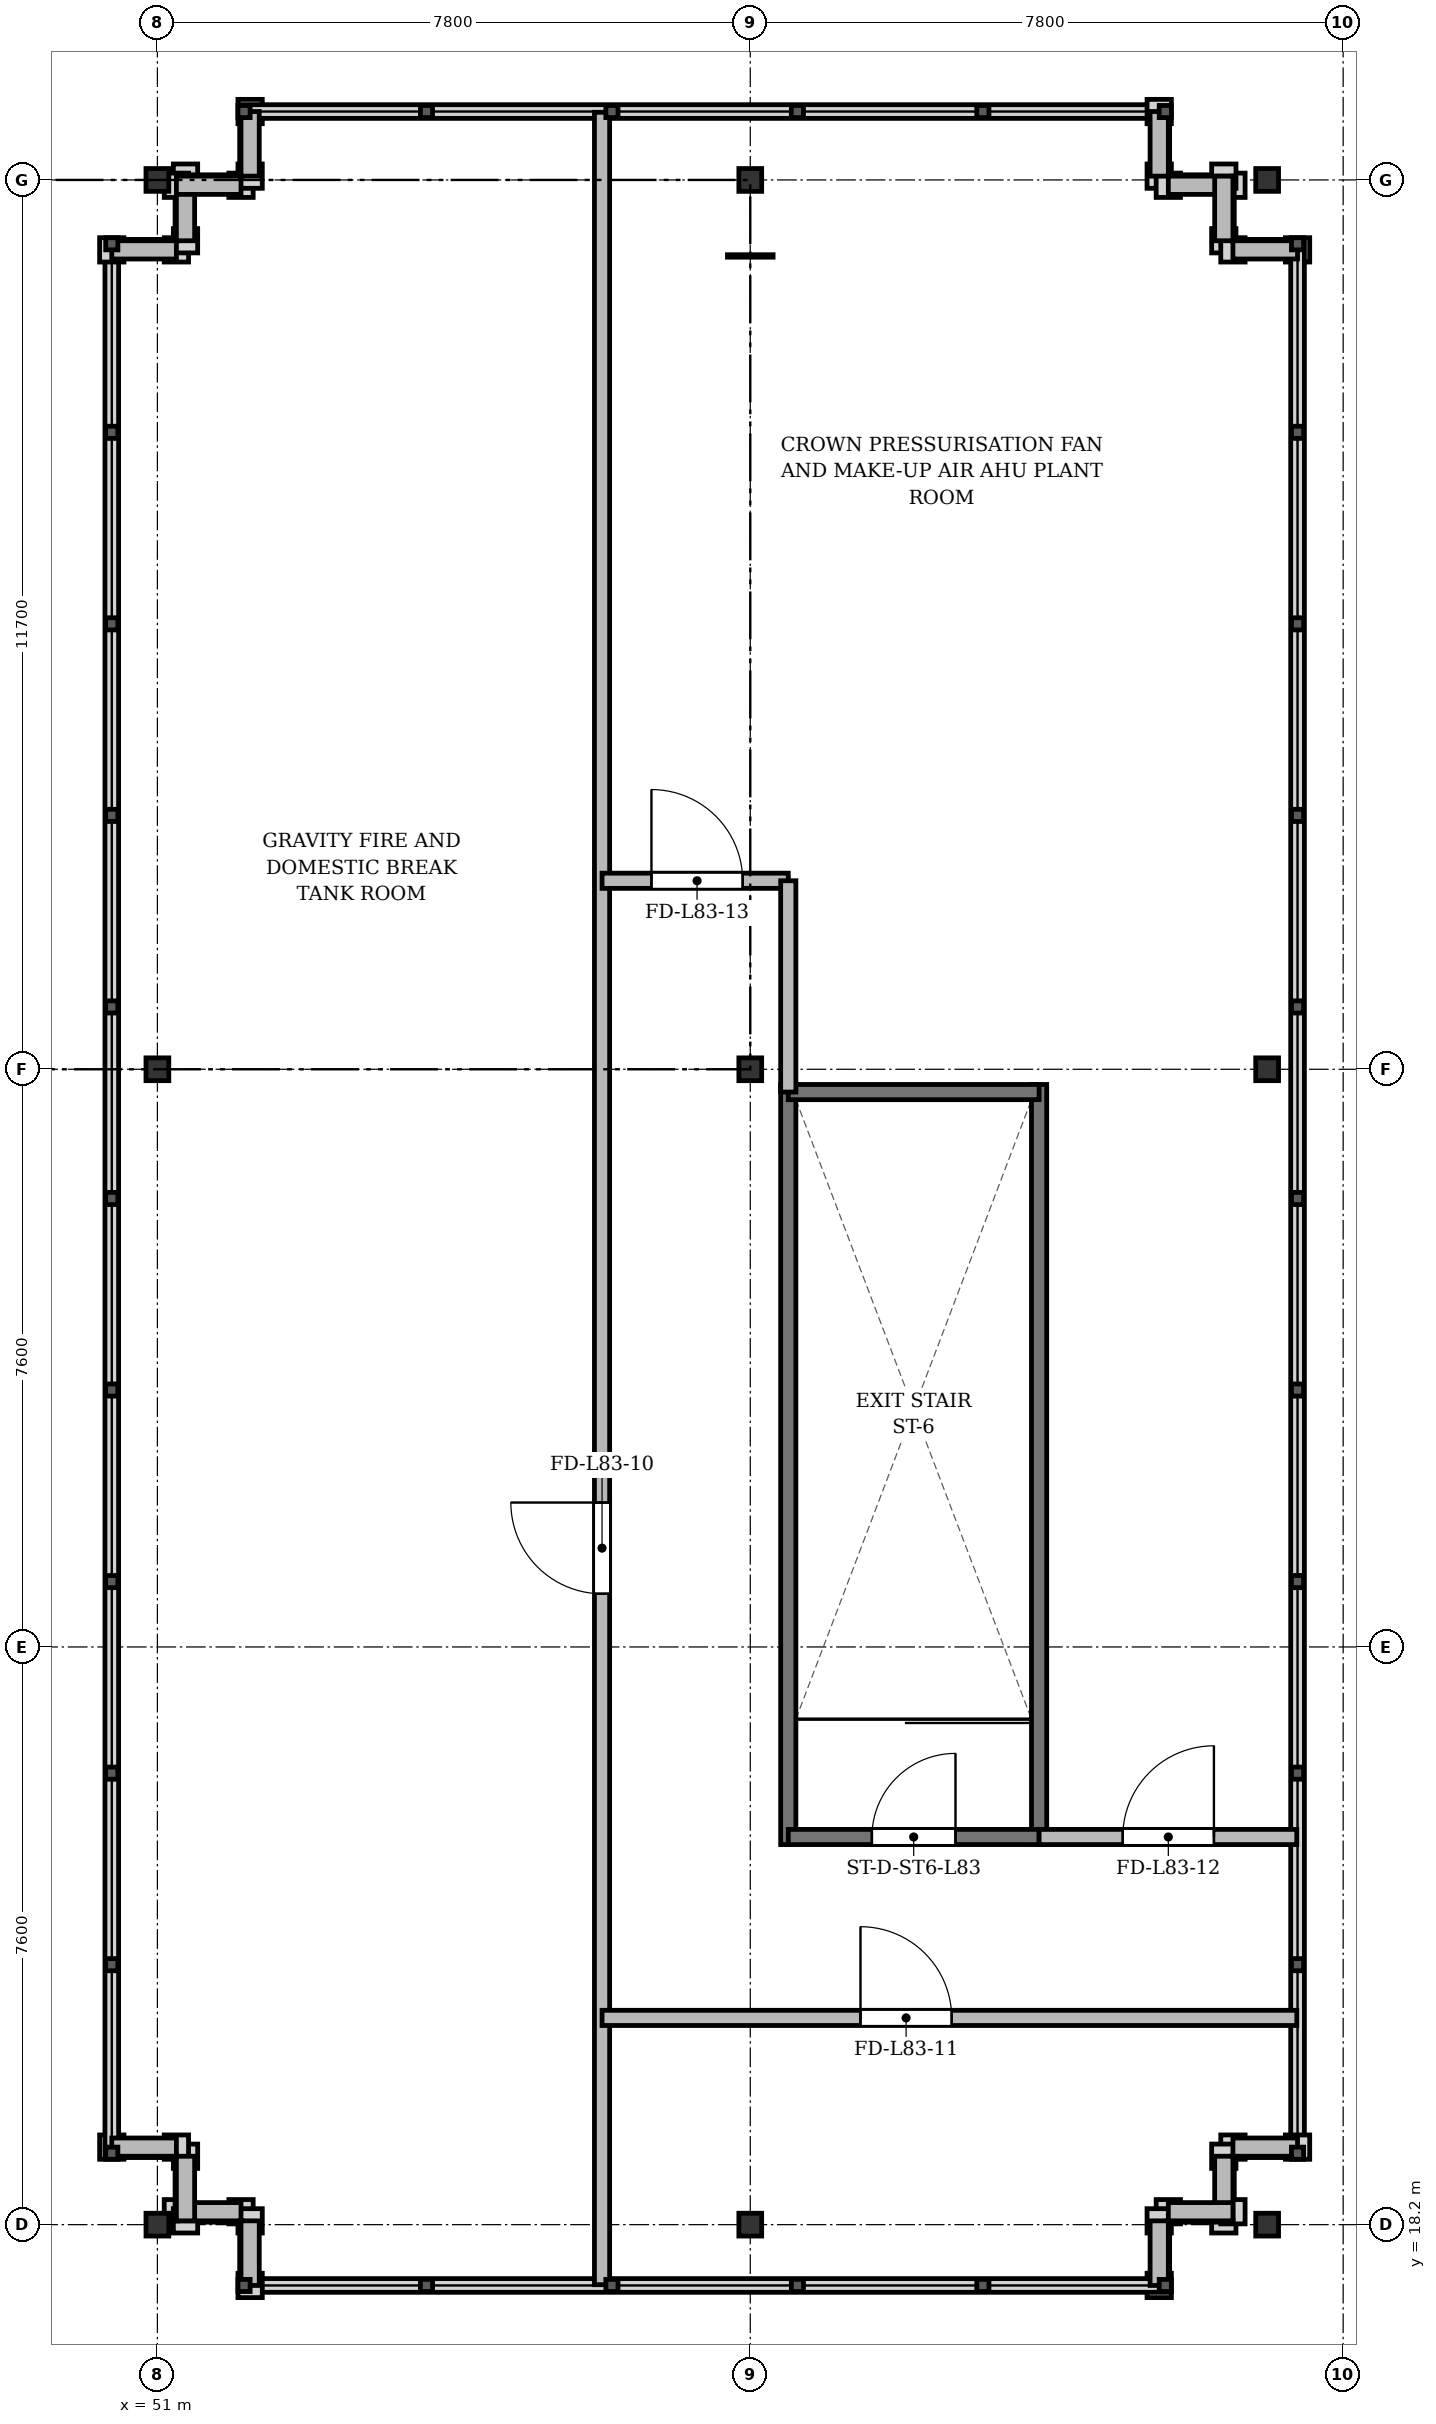
"""IFC4 building model, lengths in metres.
Left out: names, types, materials, properties, quantities, classifications, styles, units other than length and angle.
Written with IfcOpenShell. Run it as: python <this file> out.ifc"""

import sys

from ifc_helpers import new_model, si_unit, direction, frame, frame_2d, origin, origin_2d, place, context, subcontext, project, spatial, rectangle, i_section, extrude, source, transform, mapped, element, fill, save


model = new_model("IFC4")
c1 = context("Model", 3, precision=1e-05, world=origin(), true_north=direction((0.0, 1.0)))
c2 = subcontext(c1, "Body", "Model", "MODEL_VIEW")
j1 = project(units=[si_unit("LENGTHUNIT", "METRE"), si_unit("PLANEANGLEUNIT", "RADIAN")], contexts=[c1])
p1 = place(None, origin())
s1 = spatial("IfcSite", under=j1, at=p1, CompositionType="ELEMENT")
p2 = place(p1, origin())
s2 = spatial("IfcBuilding", under=s1, at=p2, CompositionType="ELEMENT")
p3 = place(p2, frame((0.0, 0.0, 320.9)))
s3 = spatial("IfcBuildingStorey", under=s2, at=p3, CompositionType="ELEMENT", Elevation=320.9)
m1 = source(origin(), c2, "Body", "SweptSolid", [
    extrude(i_section(OverallWidth=0.3, OverallDepth=0.3, WebThickness=0.015, FlangeThickness=0.024, at=origin_2d()), origin(), (0.0, 0.0, 1.0), 4.2),
])
for number, where, z_axis, x_axis in (
    (1, (51.0, 18.2, 0.0), (0.0, 0.0, 1.0), (1.0, 0.0, 0.0)),
    (2, (51.0, 33.4, 0.0), (0.0, 0.0, 1.0), (1.0, 0.0, 0.0)),
    (3, (51.0, 45.1, 0.0), (0.0, 0.0, 1.0), (1.0, 0.0, 0.0)),
    (4, (58.8, 18.2, 0.0), (0.0, 0.0, 1.0), (1.0, 0.0, 0.0)),
    (5, (58.8, 33.4, 0.0), (0.0, 0.0, 1.0), (1.0, 0.0, 0.0)),
    (6, (58.8, 45.1, 0.0), (0.0, 0.0, 1.0), (1.0, 0.0, 0.0)),
    (7, (65.6, 18.2, 0.0), (0.0, 0.0, 1.0), (1.0, 0.0, 0.0)),
    (8, (65.6, 33.4, 0.0), (0.0, 0.0, 1.0), (1.0, 0.0, 0.0)),
    (9, (65.6, 45.1, 0.0), (0.0, 0.0, 1.0), (1.0, 0.0, 0.0)),
):
    element("IfcColumn", number, at=place(p3, frame(where, z_axis=z_axis, x_axis=x_axis)), inside=s3, PredefinedType="COLUMN", context=c2, shape_type="MappedRepresentation", body=[
        mapped(m1, transform((0.0, 0.0, 0.0), x_axis=(1.0, 0.0, 0.0), y_axis=(0.0, 1.0, 0.0), z_axis=(0.0, 0.0, 1.0), scale=1.0)),
    ])
for number, where, z_axis, x_axis in (
    (10, (52.1, 18.37, 0.0), (0.0, 0.0, 1.0), (-1.0, 0.0, 0.0)),
    (11, (51.37, 18.25, 0.0), (0.0, 0.0, 1.0), (0.0, 1.0, 0.0)),
    (12, (51.25, 19.22, 0.0), (0.0, 0.0, 1.0), (-1.0, 0.0, 0.0)),
    (13, (50.4, 44.18, 0.0), (0.0, 0.0, 1.0), (1.0, 0.0, 0.0)),
):
    element("IfcWall", number, at=place(p3, frame(where, z_axis=z_axis, x_axis=x_axis)), inside=s3, PredefinedType="SOLIDWALL", context=c2, shape_type="SweptSolid", body=[
        extrude(rectangle(XDim=0.85, YDim=0.24, at=frame_2d((0.425, 0.0))), origin(), (0.0, 0.0, 1.0), 3.4),
    ])
p4 = place(p3, frame((51.37, 44.3, 0.0), z_axis=(0.0, 0.0, 1.0), x_axis=(0.0, 1.0, 0.0)))
e14 = element("IfcWall", 14, at=p4, inside=s3, PredefinedType="SOLIDWALL", context=c2, shape_type="SweptSolid", body=[
    extrude(rectangle(XDim=0.85, YDim=0.24, at=frame_2d((0.425, 0.0))), origin(), (0.0, 0.0, 1.0), 3.4),
])
for number, where, z_axis, x_axis in (
    (15, (51.25, 45.03, 0.0), (0.0, 0.0, 1.0), (1.0, 0.0, 0.0)),
    (16, (52.22, 45.15, 0.0), (0.0, 0.0, 1.0), (0.0, 1.0, 0.0)),
    (17, (64.18, 46.0, 0.0), (0.0, 0.0, 1.0), (0.0, -1.0, 0.0)),
):
    element("IfcWall", number, at=place(p3, frame(where, z_axis=z_axis, x_axis=x_axis)), inside=s3, PredefinedType="SOLIDWALL", context=c2, shape_type="SweptSolid", body=[
        extrude(rectangle(XDim=0.85, YDim=0.24, at=frame_2d((0.425, 0.0))), origin(), (0.0, 0.0, 1.0), 3.4),
    ])
for number, where, z_axis, x_axis in (
    (18, (64.3, 45.03, 0.0), (0.0, 0.0, 1.0), (1.0, 0.0, 0.0)),
    (19, (65.03, 45.15, 0.0), (0.0, 0.0, 1.0), (0.0, -1.0, 0.0)),
):
    element("IfcWall", number, at=place(p3, frame(where, z_axis=z_axis, x_axis=x_axis)), inside=s3, PredefinedType="SOLIDWALL", context=c2, shape_type="SweptSolid", body=[
        extrude(rectangle(XDim=0.85, YDim=0.24, at=frame_2d((0.425, 0.0))), origin(), (0.0, 0.0, 1.0), 3.4),
    ])
for number, where, z_axis, x_axis in (
    (20, (65.15, 44.18, 0.0), (0.0, 0.0, 1.0), (1.0, 0.0, 0.0)),
    (21, (66.0, 19.22, 0.0), (0.0, 0.0, 1.0), (-1.0, 0.0, 0.0)),
    (22, (65.03, 19.1, 0.0), (0.0, 0.0, 1.0), (0.0, -1.0, 0.0)),
):
    element("IfcWall", number, at=place(p3, frame(where, z_axis=z_axis, x_axis=x_axis)), inside=s3, PredefinedType="SOLIDWALL", context=c2, shape_type="SweptSolid", body=[
        extrude(rectangle(XDim=0.85, YDim=0.24, at=frame_2d((0.425, 0.0))), origin(), (0.0, 0.0, 1.0), 3.4),
    ])
p5 = place(p3, frame((65.15, 18.37, 0.0), z_axis=(0.0, 0.0, 1.0), x_axis=(-1.0, 0.0, 0.0)))
e23 = element("IfcWall", 23, at=p5, inside=s3, PredefinedType="SOLIDWALL", context=c2, shape_type="SweptSolid", body=[
    extrude(rectangle(XDim=0.85, YDim=0.24, at=frame_2d((0.425, 0.0))), origin(), (0.0, 0.0, 1.0), 3.4),
])
for number, where, z_axis, x_axis in (
    (24, (64.18, 18.25, 0.0), (0.0, 0.0, 1.0), (0.0, -1.0, 0.0)),
    (25, (52.22, 17.4, 0.0), (0.0, 0.0, 1.0), (0.0, 1.0, 0.0)),
):
    element("IfcWall", number, at=place(p3, frame(where, z_axis=z_axis, x_axis=x_axis)), inside=s3, PredefinedType="SOLIDWALL", context=c2, shape_type="SweptSolid", body=[
        extrude(rectangle(XDim=0.85, YDim=0.24, at=frame_2d((0.425, 0.0))), origin(), (0.0, 0.0, 1.0), 3.4),
    ])
for number, where, z_axis, x_axis in (
    (26, (59.3, 23.2, 0.0), (0.0, 0.0, 1.0), (0.0, 1.0, 0.0)),
    (27, (62.6, 23.2, 0.0), (0.0, 0.0, 1.0), (0.0, 1.0, 0.0)),
):
    element("IfcWall", number, at=place(p3, frame(where, z_axis=z_axis, x_axis=x_axis)), inside=s3, PredefinedType="SHEAR", context=c2, shape_type="SweptSolid", body=[
        extrude(rectangle(XDim=10.0, YDim=0.2, at=frame_2d((5.0, 0.0))), origin(), (0.0, 0.0, 1.0), 3.9),
    ])
p6 = place(p3, frame((59.3, 33.1, 0.0), z_axis=(0.0, 0.0, 1.0), x_axis=(1.0, 0.0, 0.0)))
e28 = element("IfcWall", 28, at=p6, inside=s3, PredefinedType="SHEAR", context=c2, shape_type="SweptSolid", body=[
    extrude(rectangle(XDim=3.3, YDim=0.2, at=frame_2d((1.65, 0.0))), origin(), (0.0, 0.0, 1.0), 3.9),
])
p7 = place(p3, frame((59.3, 23.3, 0.0), z_axis=(0.0, 0.0, 1.0), x_axis=(1.0, 0.0, 0.0)))
e29 = element("IfcWall", 29, at=p7, inside=s3, PredefinedType="SHEAR", context=c2, shape_type="SweptSolid", body=[
    extrude(rectangle(XDim=3.3, YDim=0.2, at=frame_2d((1.65, 0.0))), origin(), (0.0, 0.0, 1.0), 3.9),
])
p8 = place(p7, frame((1.1, 0.0, 0.0)))
e30 = element("IfcOpeningElement", 30, at=p8, cuts=e29, PredefinedType="OPENING", context=c2, shape_type="SweptSolid", body=[
    extrude(rectangle(XDim=1.1, YDim=2.15, at=frame_2d((0.55, 1.075))), frame((0.0, 0.11, 0.0), z_axis=(0.0, -1.0, 0.0), x_axis=(1.0, 0.0, 0.0)), (0.0, 0.0, 1.0), 0.22),
])
p9 = place(p3, frame((56.85, 17.41, 0.0), z_axis=(0.0, 0.0, 1.0), x_axis=(0.0, 1.0, 0.0)))
e31 = element("IfcWall", 31, at=p9, inside=s3, PredefinedType="PARTITIONING", context=c2, shape_type="SweptSolid", body=[
    extrude(rectangle(XDim=28.58, YDim=0.2, at=frame_2d((14.29, 0.0))), origin(), (0.0, 0.0, 1.0), 3.4),
])
p10 = place(p9, frame((9.09, 0.0, 0.0)))
e32 = element("IfcOpeningElement", 32, at=p10, cuts=e31, PredefinedType="OPENING", context=c2, shape_type="SweptSolid", body=[
    extrude(rectangle(XDim=1.2, YDim=2.15, at=frame_2d((0.6, 1.075))), frame((0.0, 0.11, 0.0), z_axis=(0.0, -1.0, 0.0), x_axis=(1.0, 0.0, 0.0)), (0.0, 0.0, 1.0), 0.22),
])
p11 = place(p3, frame((56.85, 20.92, 0.0), z_axis=(0.0, 0.0, 1.0), x_axis=(1.0, 0.0, 0.0)))
e33 = element("IfcWall", 33, at=p11, inside=s3, PredefinedType="PARTITIONING", context=c2, shape_type="SweptSolid", body=[
    extrude(rectangle(XDim=9.14, YDim=0.2, at=frame_2d((4.57, 0.0))), origin(), (0.0, 0.0, 1.0), 3.4),
])
p12 = place(p11, frame((3.4, 0.0, 0.0)))
e34 = element("IfcOpeningElement", 34, at=p12, cuts=e33, PredefinedType="OPENING", context=c2, shape_type="SweptSolid", body=[
    extrude(rectangle(XDim=1.2, YDim=2.15, at=frame_2d((0.6, 1.075))), frame((0.0, 0.11, 0.0), z_axis=(0.0, -1.0, 0.0), x_axis=(1.0, 0.0, 0.0)), (0.0, 0.0, 1.0), 0.22),
])
p13 = place(p3, frame((62.6, 23.3, 0.0), z_axis=(0.0, 0.0, 1.0), x_axis=(1.0, 0.0, 0.0)))
e35 = element("IfcWall", 35, at=p13, inside=s3, PredefinedType="PARTITIONING", context=c2, shape_type="SweptSolid", body=[
    extrude(rectangle(XDim=3.39, YDim=0.2, at=frame_2d((1.695, 0.0))), origin(), (0.0, 0.0, 1.0), 3.4),
])
p14 = place(p13, frame((1.1, 0.0, 0.0)))
e36 = element("IfcOpeningElement", 36, at=p14, cuts=e35, PredefinedType="OPENING", context=c2, shape_type="SweptSolid", body=[
    extrude(rectangle(XDim=1.2, YDim=2.15, at=frame_2d((0.6, 1.075))), frame((0.0, 0.11, 0.0), z_axis=(0.0, -1.0, 0.0), x_axis=(1.0, 0.0, 0.0)), (0.0, 0.0, 1.0), 0.22),
])
p15 = place(p3, frame((56.85, 35.88, 0.0), z_axis=(0.0, 0.0, 1.0), x_axis=(1.0, 0.0, 0.0)))
e37 = element("IfcWall", 37, at=p15, inside=s3, PredefinedType="PARTITIONING", context=c2, shape_type="SweptSolid", body=[
    extrude(rectangle(XDim=2.45, YDim=0.2, at=frame_2d((1.225, 0.0))), origin(), (0.0, 0.0, 1.0), 3.4),
])
p16 = place(p15, frame((0.65, 0.0, 0.0)))
e38 = element("IfcOpeningElement", 38, at=p16, cuts=e37, PredefinedType="OPENING", context=c2, shape_type="SweptSolid", body=[
    extrude(rectangle(XDim=1.2, YDim=2.15, at=frame_2d((0.6, 1.075))), frame((0.0, 0.11, 0.0), z_axis=(0.0, -1.0, 0.0), x_axis=(1.0, 0.0, 0.0)), (0.0, 0.0, 1.0), 0.22),
])
p17 = place(p3, frame((59.3, 33.1, 0.0), z_axis=(0.0, 0.0, 1.0), x_axis=(0.0, 1.0, 0.0)))
e39 = element("IfcWall", 39, at=p17, inside=s3, PredefinedType="PARTITIONING", context=c2, shape_type="SweptSolid", body=[
    extrude(rectangle(XDim=2.78, YDim=0.2, at=frame_2d((1.39, 0.0))), origin(), (0.0, 0.0, 1.0), 3.4),
])
m2 = source(origin(), c2, "Body", "SweptSolid", [
    extrude(rectangle(XDim=1.1, YDim=2.15, at=frame_2d((0.55, 1.075))), frame((0.0, 0.025, 0.0), z_axis=(0.0, -1.0, 0.0), x_axis=(1.0, 0.0, 0.0)), (0.0, 0.0, 1.0), 0.05),
])
p18 = place(p8, origin())
e40 = element("IfcDoor", 40, at=p18, inside=s3, OperationType="SINGLE_SWING_RIGHT", PredefinedType="DOOR", context=c2, shape_type="MappedRepresentation", body=[
    mapped(m2, transform((0.0, 0.0, 0.0), x_axis=(1.0, 0.0, 0.0), y_axis=(0.0, 1.0, 0.0), z_axis=(0.0, 0.0, 1.0), scale=1.0)),
])
fill(e30, e40)
m3 = source(origin(), c2, "Body", "SweptSolid", [
    extrude(rectangle(XDim=1.2, YDim=2.15, at=frame_2d((0.6, 1.075))), frame((0.0, 0.025, 0.0), z_axis=(0.0, -1.0, 0.0), x_axis=(1.0, 0.0, 0.0)), (0.0, 0.0, 1.0), 0.05),
])
p19 = place(p10, origin())
e41 = element("IfcDoor", 41, at=p19, inside=s3, OperationType="SINGLE_SWING_RIGHT", PredefinedType="DOOR", context=c2, shape_type="MappedRepresentation", body=[
    mapped(m3, transform((0.0, 0.0, 0.0), x_axis=(1.0, 0.0, 0.0), y_axis=(0.0, 1.0, 0.0), z_axis=(0.0, 0.0, 1.0), scale=1.0)),
])
fill(e32, e41)
p20 = place(p12, origin())
e42 = element("IfcDoor", 42, at=p20, inside=s3, OperationType="SINGLE_SWING_LEFT", PredefinedType="DOOR", context=c2, shape_type="MappedRepresentation", body=[
    mapped(m3, transform((0.0, 0.0, 0.0), x_axis=(1.0, 0.0, 0.0), y_axis=(0.0, 1.0, 0.0), z_axis=(0.0, 0.0, 1.0), scale=1.0)),
])
fill(e34, e42)
p21 = place(p14, origin())
e43 = element("IfcDoor", 43, at=p21, inside=s3, OperationType="SINGLE_SWING_RIGHT", PredefinedType="DOOR", context=c2, shape_type="MappedRepresentation", body=[
    mapped(m3, transform((0.0, 0.0, 0.0), x_axis=(1.0, 0.0, 0.0), y_axis=(0.0, 1.0, 0.0), z_axis=(0.0, 0.0, 1.0), scale=1.0)),
])
fill(e36, e43)
p22 = place(p16, origin())
e44 = element("IfcDoor", 44, at=p22, inside=s3, OperationType="SINGLE_SWING_LEFT", PredefinedType="DOOR", context=c2, shape_type="MappedRepresentation", body=[
    mapped(m3, transform((0.0, 0.0, 0.0), x_axis=(1.0, 0.0, 0.0), y_axis=(0.0, 1.0, 0.0), z_axis=(0.0, 0.0, 1.0), scale=1.0)),
])
fill(e38, e44)
save(model, sys.argv[1])
